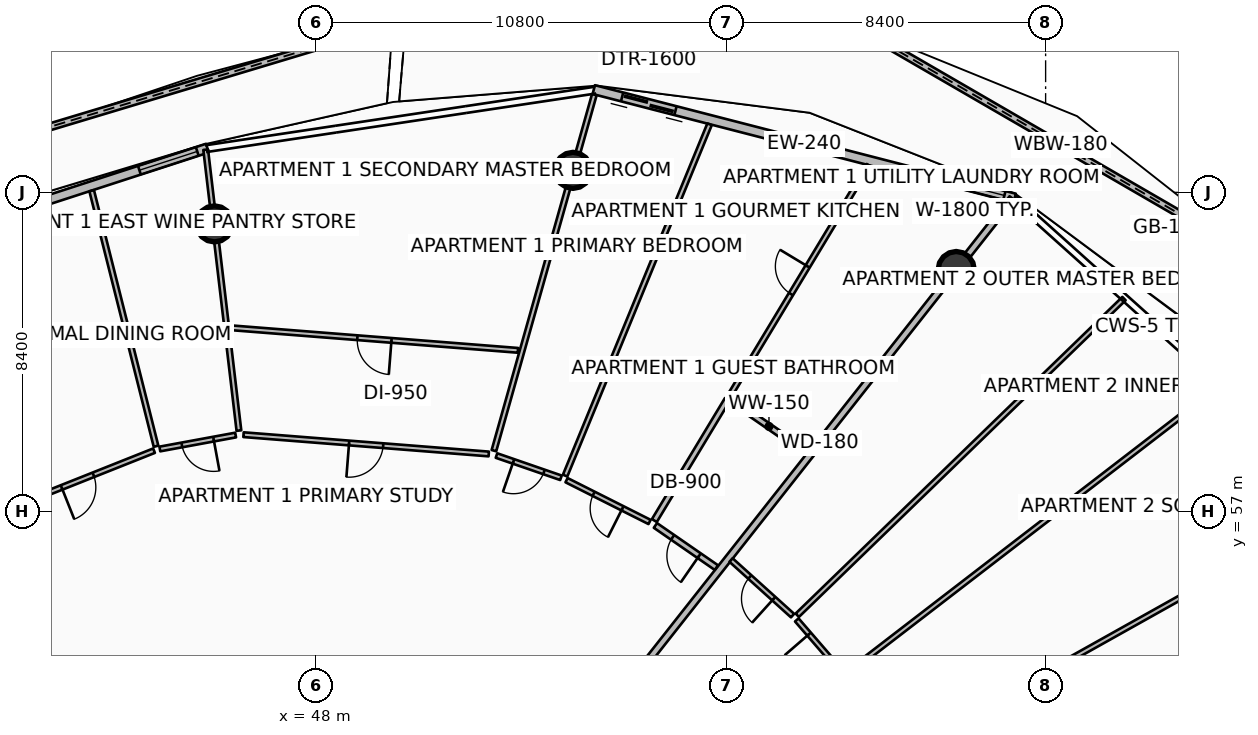
"""IFC4 building model, lengths in metres.
Left out: names, types, materials, properties, quantities, classifications, styles, units other than length and angle.
Written with IfcOpenShell. Run it as: python <this file> out.ifc"""

import sys

from ifc_helpers import new_model, si_unit, direction, frame, frame_2d, origin, origin_2d, place, context, subcontext, project, spatial, polyline, rectangle, circle, outline, extrude, element, fill, save


model = new_model("IFC4")
c1 = context("Model", 3, precision=1e-05, world=origin(), true_north=direction((0.0, 1.0)))
c2 = subcontext(c1, "Body", "Model", "MODEL_VIEW")
j1 = project(units=[si_unit("LENGTHUNIT", "METRE"), si_unit("PLANEANGLEUNIT", "RADIAN")], contexts=[c1])
p1 = place(None, origin())
s1 = spatial("IfcSite", under=j1, at=p1, CompositionType="ELEMENT")
p2 = place(p1, origin())
s2 = spatial("IfcBuilding", under=s1, at=p2, CompositionType="ELEMENT")
p3 = place(p2, frame((0.0, 0.0, 290.6)))
s3 = spatial("IfcBuildingStorey", under=s2, at=p3, CompositionType="ELEMENT", Elevation=290.6)
for number, where, z_axis, x_axis in (
    (1, (64.847, 63.371, 0.0), (0.0, 0.0, 1.0), (1.0, 0.0, 0.0)),
    (2, (54.763, 65.979, 0.0), (0.0, 0.0, 1.0), (1.0, 0.0, 0.0)),
    (3, (45.329, 64.571, 0.0), (0.0, 0.0, 1.0), (1.0, 0.0, 0.0)),
):
    element("IfcColumn", number, at=place(p3, frame(where, z_axis=z_axis, x_axis=x_axis)), inside=s3, PredefinedType="COLUMN", context=c2, shape_type="SweptSolid", body=[
        extrude(circle(Radius=0.475, at=origin_2d()), origin(), (0.0, 0.0, 1.0), 3.59),
    ])
p4 = place(p3, frame((72.927, 63.555, 0.0), z_axis=(0.0, 0.0, 1.0), x_axis=(-0.865262565506, 0.501318953097, 0.0)))
e4 = element("IfcWall", 4, at=p4, inside=s3, PredefinedType="PARAPET", context=c2, shape_type="SweptSolid", body=[
    extrude(outline(polyline([(0.0, 0.0), (12.323, 0.0), (12.323, 1.832), (6.162, 1.853), (0.0, 1.756), (0.0, 0.0)])), frame((0.0, 0.09, 0.0), z_axis=(0.0, -1.0, 0.0), x_axis=(1.0, 0.0, 0.0)), (0.0, 0.0, 1.0), 0.18),
])
p5 = place(p3, frame((50.02, 69.836, 0.0), z_axis=(0.0, 0.0, 1.0), x_axis=(-0.957650459476, -0.287933321214, 0.0)))
e5 = element("IfcWall", 5, at=p5, inside=s3, PredefinedType="PARAPET", context=c2, shape_type="SweptSolid", body=[
    extrude(outline(polyline([(0.0, 0.0), (10.406, 0.0), (10.406, 1.148), (5.203, 1.284), (0.0, 1.483), (0.0, 0.0)])), frame((0.0, 0.09, 0.0), z_axis=(0.0, -1.0, 0.0), x_axis=(1.0, 0.0, 0.0)), (0.0, 0.0, 1.0), 0.18),
])
p6 = place(p3, frame((66.386, 65.249, 0.0), z_axis=(0.0, 0.0, 1.0), x_axis=(-0.968343758421, 0.249620442927, 0.0)))
e6 = element("IfcWall", 6, at=p6, inside=s3, PredefinedType="SOLIDWALL", context=c2, shape_type="SweptSolid", body=[
    extrude(rectangle(XDim=11.438, YDim=0.24, at=frame_2d((5.719, 0.0))), origin(), (0.0, 0.0, 1.0), 2.54),
])
p7 = place(p6, frame((9.218, 0.0, 0.0)))
e7 = element("IfcOpeningElement", 7, at=p7, cuts=e6, PredefinedType="OPENING", context=c2, shape_type="SweptSolid", body=[
    extrude(rectangle(XDim=1.45, YDim=2.15, at=frame_2d((0.725, 1.075))), frame((0.0, 0.13, 0.0), z_axis=(0.0, -1.0, 0.0), x_axis=(1.0, 0.0, 0.0)), (0.0, 0.0, 1.0), 0.26),
])
p8 = place(p6, frame((0.28, 0.0, 0.65)))
e8 = element("IfcOpeningElement", 8, at=p8, cuts=e6, PredefinedType="OPENING", context=c2, shape_type="SweptSolid", body=[
    extrude(rectangle(XDim=1.6, YDim=1.5, at=frame_2d((0.8, 0.75))), frame((0.0, 0.13, 0.0), z_axis=(0.0, -1.0, 0.0), x_axis=(1.0, 0.0, 0.0)), (0.0, 0.0, 1.0), 0.26),
])
p9 = place(p3, frame((45.142, 66.564, 0.0), z_axis=(0.0, 0.0, 1.0), x_axis=(-0.951055974609, -0.309018661507, 0.0)))
e9 = element("IfcWall", 9, at=p9, inside=s3, PredefinedType="SOLIDWALL", context=c2, shape_type="SweptSolid", body=[
    extrude(rectangle(XDim=9.745, YDim=0.24, at=frame_2d((4.873, 0.0))), origin(), (0.0, 0.0, 1.0), 2.54),
])
p10 = place(p9, frame((7.525, 0.0, 0.0)))
e10 = element("IfcOpeningElement", 10, at=p10, cuts=e9, PredefinedType="OPENING", context=c2, shape_type="SweptSolid", body=[
    extrude(rectangle(XDim=1.45, YDim=2.15, at=frame_2d((0.725, 1.075))), frame((0.0, 0.13, 0.0), z_axis=(0.0, -1.0, 0.0), x_axis=(1.0, 0.0, 0.0)), (0.0, 0.0, 1.0), 0.26),
])
p11 = place(p9, frame((0.28, 0.0, 0.65)))
e11 = element("IfcOpeningElement", 11, at=p11, cuts=e9, PredefinedType="OPENING", context=c2, shape_type="SweptSolid", body=[
    extrude(rectangle(XDim=1.6, YDim=1.5, at=frame_2d((0.8, 0.75))), frame((0.0, 0.13, 0.0), z_axis=(0.0, -1.0, 0.0), x_axis=(1.0, 0.0, 0.0)), (0.0, 0.0, 1.0), 0.26),
])
p12 = place(p3, frame((56.188, 52.386, 0.0), z_axis=(0.0, 0.0, 1.0), x_axis=(0.619097230176, 0.785314344443, 0.0)))
e12 = element("IfcWall", 12, at=p12, inside=s3, PredefinedType="PARTITIONING", context=c2, shape_type="SweptSolid", body=[
    extrude(rectangle(XDim=16.37, YDim=0.18, at=frame_2d((8.185, 0.0))), origin(), (0.0, 0.0, 1.0), 2.957),
])
p13 = place(p3, frame((58.537, 55.527, 0.0), z_axis=(0.0, 0.0, 1.0), x_axis=(-0.822435430251, 0.568858473671, 0.0)))
e13 = element("IfcWall", 13, at=p13, inside=s3, PredefinedType="PARTITIONING", context=c2, shape_type="SweptSolid", body=[
    extrude(rectangle(XDim=1.951, YDim=0.15, at=frame_2d((0.975, 0.0))), origin(), (0.0, 0.0, 1.0), 2.957),
])
p14 = place(p13, frame((0.55, 0.0, 0.0)))
e14 = element("IfcOpeningElement", 14, at=p14, cuts=e13, PredefinedType="OPENING", context=c2, shape_type="SweptSolid", body=[
    extrude(rectangle(XDim=0.85, YDim=2.06, at=frame_2d((0.425, 1.03))), frame((0.0, 0.085, 0.0), z_axis=(0.0, -1.0, 0.0), x_axis=(1.0, 0.0, 0.0)), (0.0, 0.0, 1.0), 0.17),
])
p15 = place(p3, frame((60.92, 58.55, 0.0), z_axis=(0.0, 0.0, 1.0), x_axis=(-0.822394599949, 0.568917500148, 0.0)))
e15 = element("IfcWall", 15, at=p15, inside=s3, PredefinedType="PARTITIONING", context=c2, shape_type="SweptSolid", body=[
    extrude(rectangle(XDim=2.431, YDim=0.15, at=frame_2d((1.216, 0.0))), origin(), (0.0, 0.0, 1.0), 2.957),
])
p16 = place(p3, frame((56.905, 56.765, 0.0), z_axis=(0.0, 0.0, 1.0), x_axis=(0.516463378785, 0.856309277291, 0.0)))
e16 = element("IfcWall", 16, at=p16, inside=s3, PredefinedType="PARTITIONING", context=c2, shape_type="SweptSolid", body=[
    extrude(rectangle(XDim=3.72, YDim=0.15, at=frame_2d((1.86, 0.0))), origin(), (0.0, 0.0, 1.0), 3.03),
])
p17 = place(p3, frame((58.893, 60.061, 0.0), z_axis=(0.0, 0.0, 1.0), x_axis=(0.516439316059, 0.856323789713, 0.0)))
e17 = element("IfcWall", 17, at=p17, inside=s3, PredefinedType="PARTITIONING", context=c2, shape_type="SweptSolid", body=[
    extrude(rectangle(XDim=7.07, YDim=0.125, at=frame_2d((3.535, 0.0))), origin(), (0.0, 0.0, 1.0), 3.03),
])
p18 = place(p17, frame((3.11, 0.0, 0.0)))
e18 = element("IfcOpeningElement", 18, at=p18, cuts=e17, PredefinedType="OPENING", context=c2, shape_type="SweptSolid", body=[
    extrude(rectangle(XDim=0.85, YDim=2.06, at=frame_2d((0.425, 1.03))), frame((0.0, 0.073, 0.0), z_axis=(0.0, -1.0, 0.0), x_axis=(1.0, 0.0, 0.0)), (0.0, 0.0, 1.0), 0.145),
])
p19 = place(p3, frame((54.556, 57.947, 0.0), z_axis=(0.0, 0.0, 1.0), x_axis=(0.380247271433, 0.924884864493, 0.0)))
e19 = element("IfcWall", 19, at=p19, inside=s3, PredefinedType="PARTITIONING", context=c2, shape_type="SweptSolid", body=[
    extrude(rectangle(XDim=9.995, YDim=0.125, at=frame_2d((4.998, 0.0))), origin(), (0.0, 0.0, 1.0), 3.03),
])
p20 = place(p3, frame((56.778, 56.728, 0.0), z_axis=(0.0, 0.0, 1.0), x_axis=(-0.893226093112, 0.449607769711, 0.0)))
e20 = element("IfcWall", 20, at=p20, inside=s3, PredefinedType="PARTITIONING", context=c2, shape_type="SweptSolid", body=[
    extrude(rectangle(XDim=2.446, YDim=0.125, at=frame_2d((1.223, 0.0))), origin(), (0.0, 0.0, 1.0), 3.03),
])
p21 = place(p20, frame((0.798, 0.0, 0.0)))
e21 = element("IfcOpeningElement", 21, at=p21, cuts=e20, PredefinedType="OPENING", context=c2, shape_type="SweptSolid", body=[
    extrude(rectangle(XDim=0.85, YDim=2.06, at=frame_2d((0.425, 1.03))), frame((0.0, 0.073, 0.0), z_axis=(0.0, -1.0, 0.0), x_axis=(1.0, 0.0, 0.0)), (0.0, 0.0, 1.0), 0.145),
])
p22 = place(p3, frame((54.446, 57.89, 0.0), z_axis=(0.0, 0.0, 1.0), x_axis=(-0.945268821385, 0.326292591576, 0.0)))
e22 = element("IfcWall", 22, at=p22, inside=s3, PredefinedType="PARTITIONING", context=c2, shape_type="SweptSolid", body=[
    extrude(rectangle(XDim=1.794, YDim=0.125, at=frame_2d((0.897, 0.0))), origin(), (0.0, 0.0, 1.0), 2.957),
])
p23 = place(p22, frame((0.472, 0.0, 0.0)))
e23 = element("IfcOpeningElement", 23, at=p23, cuts=e22, PredefinedType="OPENING", context=c2, shape_type="SweptSolid", body=[
    extrude(rectangle(XDim=0.85, YDim=2.06, at=frame_2d((0.425, 1.03))), frame((0.0, 0.073, 0.0), z_axis=(0.0, -1.0, 0.0), x_axis=(1.0, 0.0, 0.0)), (0.0, 0.0, 1.0), 0.145),
])
p24 = place(p3, frame((52.683, 58.604, 0.0), z_axis=(0.0, 0.0, 1.0), x_axis=(0.271442886698, 0.962454549192, 0.0)))
e24 = element("IfcWall", 24, at=p24, inside=s3, PredefinedType="PARTITIONING", context=c2, shape_type="SweptSolid", body=[
    extrude(rectangle(XDim=9.733, YDim=0.125, at=frame_2d((4.866, 0.0))), origin(), (0.0, 0.0, 1.0), 2.957),
])
p25 = place(p3, frame((52.546, 58.517, 0.0), z_axis=(0.0, 0.0, 1.0), x_axis=(-0.996917123382, 0.078461768451, 0.0)))
e25 = element("IfcWall", 25, at=p25, inside=s3, PredefinedType="PARTITIONING", context=c2, shape_type="SweptSolid", body=[
    extrude(rectangle(XDim=6.472, YDim=0.125, at=frame_2d((3.236, 0.0))), origin(), (0.0, 0.0, 1.0), 2.957),
])
p26 = place(p25, frame((2.786, 0.0, 0.0)))
e26 = element("IfcOpeningElement", 26, at=p26, cuts=e25, PredefinedType="OPENING", context=c2, shape_type="SweptSolid", body=[
    extrude(rectangle(XDim=0.9, YDim=2.08, at=frame_2d((0.45, 1.04))), frame((0.0, 0.073, 0.0), z_axis=(0.0, -1.0, 0.0), x_axis=(1.0, 0.0, 0.0)), (0.0, 0.0, 1.0), 0.145),
])
p27 = place(p3, frame((53.315, 61.243, 0.0), z_axis=(0.0, 0.0, 1.0), x_axis=(-0.996917808025, 0.07845306905, 0.0)))
e27 = element("IfcWall", 27, at=p27, inside=s3, PredefinedType="PARTITIONING", context=c2, shape_type="SweptSolid", body=[
    extrude(rectangle(XDim=7.578, YDim=0.125, at=frame_2d((3.789, 0.0))), origin(), (0.0, 0.0, 1.0), 2.957),
])
p28 = place(p27, frame((3.339, 0.0, 0.0)))
e28 = element("IfcOpeningElement", 28, at=p28, cuts=e27, PredefinedType="OPENING", context=c2, shape_type="SweptSolid", body=[
    extrude(rectangle(XDim=0.9, YDim=2.08, at=frame_2d((0.45, 1.04))), frame((0.0, 0.073, 0.0), z_axis=(0.0, -1.0, 0.0), x_axis=(1.0, 0.0, 0.0)), (0.0, 0.0, 1.0), 0.145),
])
p29 = place(p3, frame((45.972, 59.132, 0.0), z_axis=(0.0, 0.0, 1.0), x_axis=(-0.117532091281, 0.993069084968, 0.0)))
e29 = element("IfcWall", 29, at=p29, inside=s3, PredefinedType="PARTITIONING", context=c2, shape_type="SweptSolid", body=[
    extrude(rectangle(XDim=7.443, YDim=0.125, at=frame_2d((3.721, 0.0))), origin(), (0.0, 0.0, 1.0), 2.957),
])
p30 = place(p3, frame((43.791, 58.72, 0.0), z_axis=(0.0, 0.0, 1.0), x_axis=(-0.244109618429, 0.969747644591, 0.0)))
e30 = element("IfcWall", 30, at=p30, inside=s3, PredefinedType="PARTITIONING", context=c2, shape_type="SweptSolid", body=[
    extrude(rectangle(XDim=6.933, YDim=0.125, at=frame_2d((3.466, 0.0))), origin(), (0.0, 0.0, 1.0), 3.03),
])
p31 = place(p3, frame((45.886, 59.015, 0.0), z_axis=(0.0, 0.0, 1.0), x_axis=(-0.983466734408, -0.181088879597, 0.0)))
e31 = element("IfcWall", 31, at=p31, inside=s3, PredefinedType="PARTITIONING", context=c2, shape_type="SweptSolid", body=[
    extrude(rectangle(XDim=2.028, YDim=0.125, at=frame_2d((1.014, 0.0))), origin(), (0.0, 0.0, 1.0), 2.957),
])
p32 = place(p31, frame((0.589, 0.0, 0.0)))
e32 = element("IfcOpeningElement", 32, at=p32, cuts=e31, PredefinedType="OPENING", context=c2, shape_type="SweptSolid", body=[
    extrude(rectangle(XDim=0.85, YDim=2.06, at=frame_2d((0.425, 1.03))), frame((0.0, 0.073, 0.0), z_axis=(0.0, -1.0, 0.0), x_axis=(1.0, 0.0, 0.0)), (0.0, 0.0, 1.0), 0.145),
])
p33 = place(p3, frame((43.739, 58.604, 0.0), z_axis=(0.0, 0.0, 1.0), x_axis=(-0.929209277864, -0.369553944549, 0.0)))
e33 = element("IfcWall", 33, at=p33, inside=s3, PredefinedType="PARTITIONING", context=c2, shape_type="SweptSolid", body=[
    extrude(rectangle(XDim=4.333, YDim=0.125, at=frame_2d((2.167, 0.0))), origin(), (0.0, 0.0, 1.0), 2.957),
])
p34 = place(p33, frame((1.717, 0.0, 0.0)))
e34 = element("IfcOpeningElement", 34, at=p34, cuts=e33, PredefinedType="OPENING", context=c2, shape_type="SweptSolid", body=[
    extrude(rectangle(XDim=0.9, YDim=2.08, at=frame_2d((0.45, 1.04))), frame((0.0, 0.073, 0.0), z_axis=(0.0, -1.0, 0.0), x_axis=(1.0, 0.0, 0.0)), (0.0, 0.0, 1.0), 0.145),
])
p35 = place(p3, frame((63.396, 50.622, 0.0), z_axis=(0.0, 0.0, 1.0), x_axis=(0.872499176967, 0.4886155812, 0.0)))
e35 = element("IfcWall", 35, at=p35, inside=s3, PredefinedType="PARTITIONING", context=c2, shape_type="SweptSolid", body=[
    extrude(rectangle(XDim=12.784, YDim=0.125, at=frame_2d((6.392, 0.0))), origin(), (0.0, 0.0, 1.0), 2.957),
])
p36 = place(p3, frame((61.978, 52.754, 0.0), z_axis=(0.0, 0.0, 1.0), x_axis=(0.792559605076, 0.609794450944, 0.0)))
e36 = element("IfcWall", 36, at=p36, inside=s3, PredefinedType="PARTITIONING", context=c2, shape_type="SweptSolid", body=[
    extrude(rectangle(XDim=12.406, YDim=0.125, at=frame_2d((6.203, 0.0))), origin(), (0.0, 0.0, 1.0), 3.03),
])
p37 = place(p3, frame((60.665, 54.273, 0.0), z_axis=(0.0, 0.0, 1.0), x_axis=(0.718133524399, 0.695905339205, 0.0)))
e37 = element("IfcWall", 37, at=p37, inside=s3, PredefinedType="PARTITIONING", context=c2, shape_type="SweptSolid", body=[
    extrude(rectangle(XDim=11.972, YDim=0.125, at=frame_2d((5.986, 0.0))), origin(), (0.0, 0.0, 1.0), 3.03),
])
p38 = place(p3, frame((61.854, 52.76, 0.0), z_axis=(0.0, 0.0, 1.0), x_axis=(-0.653948493608, 0.756539072162, 0.0)))
e38 = element("IfcWall", 38, at=p38, inside=s3, PredefinedType="PARTITIONING", context=c2, shape_type="SweptSolid", body=[
    extrude(rectangle(XDim=1.837, YDim=0.125, at=frame_2d((0.918, 0.0))), origin(), (0.0, 0.0, 1.0), 3.03),
])
p39 = place(p38, frame((0.494, 0.0, 0.0)))
e39 = element("IfcOpeningElement", 39, at=p39, cuts=e38, PredefinedType="OPENING", context=c2, shape_type="SweptSolid", body=[
    extrude(rectangle(XDim=0.85, YDim=2.06, at=frame_2d((0.425, 1.03))), frame((0.0, 0.073, 0.0), z_axis=(0.0, -1.0, 0.0), x_axis=(1.0, 0.0, 0.0)), (0.0, 0.0, 1.0), 0.145),
])
p40 = place(p3, frame((60.541, 54.264, 0.0), z_axis=(0.0, 0.0, 1.0), x_axis=(-0.742235558018, 0.670139072443, 0.0)))
e40 = element("IfcWall", 40, at=p40, inside=s3, PredefinedType="PARTITIONING", context=c2, shape_type="SweptSolid", body=[
    extrude(rectangle(XDim=2.181, YDim=0.125, at=frame_2d((1.09, 0.0))), origin(), (0.0, 0.0, 1.0), 2.957),
])
p41 = place(p40, frame((0.666, 0.0, 0.0)))
e41 = element("IfcOpeningElement", 41, at=p41, cuts=e40, PredefinedType="OPENING", context=c2, shape_type="SweptSolid", body=[
    extrude(rectangle(XDim=0.85, YDim=2.06, at=frame_2d((0.425, 1.03))), frame((0.0, 0.073, 0.0), z_axis=(0.0, -1.0, 0.0), x_axis=(1.0, 0.0, 0.0)), (0.0, 0.0, 1.0), 0.145),
])
p42 = place(p7, origin())
e42 = element("IfcDoor", 42, at=p42, inside=s3, OperationType="DOUBLE_DOOR_SLIDING", PredefinedType="DOOR", context=c2, shape_type="SweptSolid", body=[
    extrude(rectangle(XDim=1.45, YDim=2.15, at=frame_2d((0.725, 1.075))), frame((0.0, 0.025, 0.0), z_axis=(0.0, -1.0, 0.0), x_axis=(1.0, 0.0, 0.0)), (0.0, 0.0, 1.0), 0.05),
])
fill(e7, e42)
p43 = place(p8, origin())
e43 = element("IfcWindow", 43, at=p43, inside=s3, PartitioningType="SINGLE_PANEL", PredefinedType="WINDOW", context=c2, shape_type="SweptSolid", body=[
    extrude(rectangle(XDim=1.6, YDim=1.5, at=frame_2d((0.8, 0.75))), frame((0.0, 0.03, 0.0), z_axis=(0.0, -1.0, 0.0), x_axis=(1.0, 0.0, 0.0)), (0.0, 0.0, 1.0), 0.06),
])
fill(e8, e43)
p44 = place(p11, origin())
e44 = element("IfcWindow", 44, at=p44, inside=s3, PartitioningType="SINGLE_PANEL", PredefinedType="WINDOW", context=c2, shape_type="SweptSolid", body=[
    extrude(rectangle(XDim=1.6, YDim=1.5, at=frame_2d((0.8, 0.75))), frame((0.0, 0.03, 0.0), z_axis=(0.0, -1.0, 0.0), x_axis=(1.0, 0.0, 0.0)), (0.0, 0.0, 1.0), 0.06),
])
fill(e11, e44)
p45 = place(p14, origin())
e45 = element("IfcDoor", 45, at=p45, inside=s3, OperationType="SINGLE_SWING_LEFT", PredefinedType="DOOR", context=c2, shape_type="SweptSolid", body=[
    extrude(rectangle(XDim=0.85, YDim=2.06, at=frame_2d((0.425, 1.03))), frame((0.0, 0.025, 0.0), z_axis=(0.0, -1.0, 0.0), x_axis=(1.0, 0.0, 0.0)), (0.0, 0.0, 1.0), 0.05),
])
fill(e14, e45)
p46 = place(p18, origin())
e46 = element("IfcDoor", 46, at=p46, inside=s3, OperationType="SINGLE_SWING_RIGHT", PredefinedType="DOOR", context=c2, shape_type="SweptSolid", body=[
    extrude(rectangle(XDim=0.85, YDim=2.06, at=frame_2d((0.425, 1.03))), frame((0.0, 0.025, 0.0), z_axis=(0.0, -1.0, 0.0), x_axis=(1.0, 0.0, 0.0)), (0.0, 0.0, 1.0), 0.05),
])
fill(e18, e46)
p47 = place(p21, origin())
e47 = element("IfcDoor", 47, at=p47, inside=s3, OperationType="SINGLE_SWING_LEFT", PredefinedType="DOOR", context=c2, shape_type="SweptSolid", body=[
    extrude(rectangle(XDim=0.85, YDim=2.06, at=frame_2d((0.425, 1.03))), frame((0.0, 0.025, 0.0), z_axis=(0.0, -1.0, 0.0), x_axis=(1.0, 0.0, 0.0)), (0.0, 0.0, 1.0), 0.05),
])
fill(e21, e47)
p48 = place(p23, origin())
e48 = element("IfcDoor", 48, at=p48, inside=s3, OperationType="SINGLE_SWING_RIGHT", PredefinedType="DOOR", context=c2, shape_type="SweptSolid", body=[
    extrude(rectangle(XDim=0.85, YDim=2.06, at=frame_2d((0.425, 1.03))), frame((0.0, 0.025, 0.0), z_axis=(0.0, -1.0, 0.0), x_axis=(1.0, 0.0, 0.0)), (0.0, 0.0, 1.0), 0.05),
])
fill(e23, e48)
p49 = place(p26, origin())
e49 = element("IfcDoor", 49, at=p49, inside=s3, OperationType="SINGLE_SWING_RIGHT", PredefinedType="DOOR", context=c2, shape_type="SweptSolid", body=[
    extrude(rectangle(XDim=0.9, YDim=2.08, at=frame_2d((0.45, 1.04))), frame((0.0, 0.025, 0.0), z_axis=(0.0, -1.0, 0.0), x_axis=(1.0, 0.0, 0.0)), (0.0, 0.0, 1.0), 0.05),
])
fill(e26, e49)
p50 = place(p28, origin())
e50 = element("IfcDoor", 50, at=p50, inside=s3, OperationType="SINGLE_SWING_LEFT", PredefinedType="DOOR", context=c2, shape_type="SweptSolid", body=[
    extrude(rectangle(XDim=0.9, YDim=2.08, at=frame_2d((0.45, 1.04))), frame((0.0, 0.025, 0.0), z_axis=(0.0, -1.0, 0.0), x_axis=(1.0, 0.0, 0.0)), (0.0, 0.0, 1.0), 0.05),
])
fill(e28, e50)
p51 = place(p32, origin())
e51 = element("IfcDoor", 51, at=p51, inside=s3, OperationType="SINGLE_SWING_LEFT", PredefinedType="DOOR", context=c2, shape_type="SweptSolid", body=[
    extrude(rectangle(XDim=0.85, YDim=2.06, at=frame_2d((0.425, 1.03))), frame((0.0, 0.025, 0.0), z_axis=(0.0, -1.0, 0.0), x_axis=(1.0, 0.0, 0.0)), (0.0, 0.0, 1.0), 0.05),
])
fill(e32, e51)
p52 = place(p34, origin())
e52 = element("IfcDoor", 52, at=p52, inside=s3, OperationType="SINGLE_SWING_RIGHT", PredefinedType="DOOR", context=c2, shape_type="SweptSolid", body=[
    extrude(rectangle(XDim=0.9, YDim=2.08, at=frame_2d((0.45, 1.04))), frame((0.0, 0.025, 0.0), z_axis=(0.0, -1.0, 0.0), x_axis=(1.0, 0.0, 0.0)), (0.0, 0.0, 1.0), 0.05),
])
fill(e34, e52)
p53 = place(p39, origin())
e53 = element("IfcDoor", 53, at=p53, inside=s3, OperationType="SINGLE_SWING_RIGHT", PredefinedType="DOOR", context=c2, shape_type="SweptSolid", body=[
    extrude(rectangle(XDim=0.85, YDim=2.06, at=frame_2d((0.425, 1.03))), frame((0.0, 0.025, 0.0), z_axis=(0.0, -1.0, 0.0), x_axis=(1.0, 0.0, 0.0)), (0.0, 0.0, 1.0), 0.05),
])
fill(e39, e53)
p54 = place(p41, origin())
e54 = element("IfcDoor", 54, at=p54, inside=s3, OperationType="SINGLE_SWING_LEFT", PredefinedType="DOOR", context=c2, shape_type="SweptSolid", body=[
    extrude(rectangle(XDim=0.85, YDim=2.06, at=frame_2d((0.425, 1.03))), frame((0.0, 0.025, 0.0), z_axis=(0.0, -1.0, 0.0), x_axis=(1.0, 0.0, 0.0)), (0.0, 0.0, 1.0), 0.05),
])
fill(e41, e54)
save(model, sys.argv[1])
